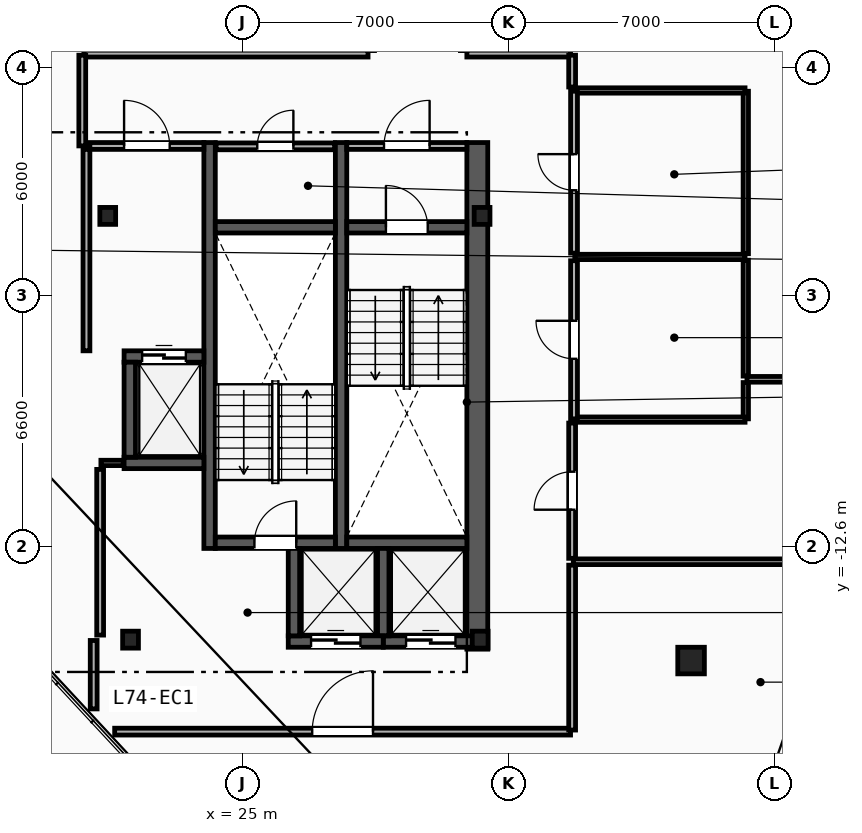
"""IFC4 building model, lengths in metres.
Left out: names, types, materials, properties, quantities, classifications, styles, units other than length and angle.
Written with IfcOpenShell. Run it as: python <this file> out.ifc"""

import sys

from ifc_helpers import new_model, si_unit, direction, frame, frame_2d, origin, origin_2d, place, context, subcontext, project, spatial, rectangle, i_section, extrude, element, fill, save


model = new_model("IFC4")
c1 = context("Model", 3, precision=1e-05, world=origin(), true_north=direction((0.0, 1.0)))
c2 = subcontext(c1, "Body", "Model", "MODEL_VIEW")
j1 = project(units=[si_unit("LENGTHUNIT", "METRE"), si_unit("PLANEANGLEUNIT", "RADIAN")], contexts=[c1])
p1 = place(None, origin())
s1 = spatial("IfcSite", under=j1, at=p1, CompositionType="ELEMENT")
p2 = place(p1, origin())
s2 = spatial("IfcBuilding", under=s1, at=p2, CompositionType="ELEMENT")
p3 = place(p2, frame((0.0, 0.0, 279.2)))
s3 = spatial("IfcBuildingStorey", under=s2, at=p3, CompositionType="ELEMENT", Elevation=279.2)
for number, where, z_axis, x_axis in (
    (1, (31.3, -3.9, 0.0), (0.0, 0.0, 1.0), (1.0, 0.0, 0.0)),
    (2, (21.45, -3.9, 0.0), (0.0, 0.0, 1.0), (1.0, 0.0, 0.0)),
    (3, (22.05, -15.05, 0.0), (0.0, 0.0, 1.0), (1.0, 0.0, 0.0)),
    (4, (31.25, -15.05, 0.0), (0.0, 0.0, 1.0), (1.0, 0.0, 0.0)),
):
    element("IfcColumn", number, at=place(p3, frame(where, z_axis=z_axis, x_axis=x_axis)), inside=s3, PredefinedType="COLUMN", context=c2, shape_type="SweptSolid", body=[
        extrude(i_section(OverallWidth=0.416, OverallDepth=0.446, WebThickness=0.039, FlangeThickness=0.063, FilletRadius=0.018, at=origin_2d()), origin(), (0.0, 0.0, 1.0), 3.6),
    ])
p4 = place(p3, frame((36.8, -15.6, 0.0), z_axis=(0.0, 0.0, 1.0), x_axis=(1.0, 0.0, 0.0)))
e5 = element("IfcColumn", 5, at=p4, inside=s3, PredefinedType="COLUMN", context=c2, shape_type="SweptSolid", body=[
    extrude(rectangle(XDim=0.7, YDim=0.7, at=origin_2d()), origin(), (0.0, 0.0, 1.0), 3.6),
])
p5 = place(p3, frame((31.175, -15.3, 0.0), z_axis=(0.0, 0.0, 1.0), x_axis=(0.0, 1.0, 0.0)))
e6 = element("IfcWall", 6, at=p5, inside=s3, PredefinedType="SHEAR", context=c2, shape_type="SweptSolid", body=[
    extrude(rectangle(XDim=13.33, YDim=0.55, at=frame_2d((6.665, 0.0))), origin(), (0.0, 0.0, 1.0), 3.34),
])
for number, where, z_axis, x_axis in (
    (7, (27.59, -12.65, 0.0), (0.0, 0.0, 1.0), (0.0, 1.0, 0.0)),
    (8, (24.13, -12.65, 0.0), (0.0, 0.0, 1.0), (0.0, 1.0, 0.0)),
):
    element("IfcWall", number, at=place(p3, frame(where, z_axis=z_axis, x_axis=x_axis)), inside=s3, PredefinedType="SHEAR", context=c2, shape_type="SweptSolid", body=[
        extrude(rectangle(XDim=10.68, YDim=0.3, at=frame_2d((5.34, 0.0))), origin(), (0.0, 0.0, 1.0), 3.34),
    ])
p6 = place(p3, frame((27.74, -4.2, 0.0), z_axis=(0.0, 0.0, 1.0), x_axis=(1.0, 0.0, 0.0)))
e9 = element("IfcWall", 9, at=p6, inside=s3, PredefinedType="SHEAR", context=c2, shape_type="SweptSolid", body=[
    extrude(rectangle(XDim=3.16, YDim=0.3, at=frame_2d((1.58, 0.0))), origin(), (0.0, 0.0, 1.0), 3.34),
])
p7 = place(p6, frame((1.03, 0.0, 0.0)))
e10 = element("IfcOpeningElement", 10, at=p7, cuts=e9, PredefinedType="OPENING", context=c2, shape_type="SweptSolid", body=[
    extrude(rectangle(XDim=1.1, YDim=2.15, at=frame_2d((0.55, 1.075))), frame((0.0, 0.16, 0.0), z_axis=(0.0, -1.0, 0.0), x_axis=(1.0, 0.0, 0.0)), (0.0, 0.0, 1.0), 0.32),
])
p8 = place(p3, frame((27.74, -12.5, 0.0), z_axis=(0.0, 0.0, 1.0), x_axis=(1.0, 0.0, 0.0)))
e11 = element("IfcWall", 11, at=p8, inside=s3, PredefinedType="SHEAR", context=c2, shape_type="SweptSolid", body=[
    extrude(rectangle(XDim=3.16, YDim=0.3, at=frame_2d((1.58, 0.0))), origin(), (0.0, 0.0, 1.0), 3.34),
])
p9 = place(p3, frame((24.28, -12.5, 0.0), z_axis=(0.0, 0.0, 1.0), x_axis=(1.0, 0.0, 0.0)))
e12 = element("IfcWall", 12, at=p9, inside=s3, PredefinedType="SHEAR", context=c2, shape_type="SweptSolid", body=[
    extrude(rectangle(XDim=3.16, YDim=0.3, at=frame_2d((1.58, 0.0))), origin(), (0.0, 0.0, 1.0), 3.34),
])
p10 = place(p9, frame((1.03, 0.0, 0.0)))
e13 = element("IfcOpeningElement", 13, at=p10, cuts=e12, PredefinedType="OPENING", context=c2, shape_type="SweptSolid", body=[
    extrude(rectangle(XDim=1.1, YDim=2.15, at=frame_2d((0.55, 1.075))), frame((0.0, 0.16, 0.0), z_axis=(0.0, -1.0, 0.0), x_axis=(1.0, 0.0, 0.0)), (0.0, 0.0, 1.0), 0.32),
])
p11 = place(p3, frame((24.28, -4.2, 0.0), z_axis=(0.0, 0.0, 1.0), x_axis=(1.0, 0.0, 0.0)))
e14 = element("IfcWall", 14, at=p11, inside=s3, PredefinedType="SHEAR", context=c2, shape_type="SweptSolid", body=[
    extrude(rectangle(XDim=3.16, YDim=0.3, at=frame_2d((1.58, 0.0))), origin(), (0.0, 0.0, 1.0), 3.34),
])
p12 = place(p3, frame((20.89, -7.45, 0.0), z_axis=(0.0, 0.0, 1.0), x_axis=(0.0, 1.0, 0.0)))
e15 = element("IfcWall", 15, at=p12, inside=s3, PredefinedType="PARTITIONING", context=c2, shape_type="SweptSolid", body=[
    extrude(rectangle(XDim=5.3, YDim=0.18, at=frame_2d((2.65, 0.0))), origin(), (0.0, 0.0, 1.0), 3.34),
])
p13 = place(p3, frame((20.98, -2.06, 0.0), z_axis=(0.0, 0.0, 1.0), x_axis=(1.0, 0.0, 0.0)))
e16 = element("IfcWall", 16, at=p13, inside=s3, PredefinedType="PARTITIONING", context=c2, shape_type="SweptSolid", body=[
    extrude(rectangle(XDim=3.0, YDim=0.18, at=frame_2d((1.5, 0.0))), origin(), (0.0, 0.0, 1.0), 3.34),
])
p14 = place(p13, frame((0.9, 0.0, 0.0)))
e17 = element("IfcOpeningElement", 17, at=p14, cuts=e16, PredefinedType="OPENING", context=c2, shape_type="SweptSolid", body=[
    extrude(rectangle(XDim=1.2, YDim=2.15, at=frame_2d((0.6, 1.075))), frame((0.0, 0.1, 0.0), z_axis=(0.0, -1.0, 0.0), x_axis=(1.0, 0.0, 0.0)), (0.0, 0.0, 1.0), 0.2),
])
p15 = place(p3, frame((27.74, -2.06, 0.0), z_axis=(0.0, 0.0, 1.0), x_axis=(1.0, 0.0, 0.0)))
e18 = element("IfcWall", 18, at=p15, inside=s3, PredefinedType="PARTITIONING", context=c2, shape_type="SweptSolid", body=[
    extrude(rectangle(XDim=3.16, YDim=0.18, at=frame_2d((1.58, 0.0))), origin(), (0.0, 0.0, 1.0), 3.34),
])
p16 = place(p15, frame((0.98, 0.0, 0.0)))
e19 = element("IfcOpeningElement", 19, at=p16, cuts=e18, PredefinedType="OPENING", context=c2, shape_type="SweptSolid", body=[
    extrude(rectangle(XDim=1.2, YDim=2.15, at=frame_2d((0.6, 1.075))), frame((0.0, 0.1, 0.0), z_axis=(0.0, -1.0, 0.0), x_axis=(1.0, 0.0, 0.0)), (0.0, 0.0, 1.0), 0.2),
])
p17 = place(p3, frame((21.88, -7.6, 0.0), z_axis=(0.0, 0.0, 1.0), x_axis=(1.0, 0.0, 0.0)))
e20 = element("IfcWall", 20, at=p17, inside=s3, PredefinedType="SHEAR", context=c2, shape_type="SweptSolid", body=[
    extrude(rectangle(XDim=2.1, YDim=0.3, at=frame_2d((1.05, 0.0))), origin(), (0.0, 0.0, 1.0), 3.34),
])
p18 = place(p17, frame((0.475, 0.0, 0.0)))
e21 = element("IfcOpeningElement", 21, at=p18, cuts=e20, PredefinedType="OPENING", context=c2, shape_type="SweptSolid", body=[
    extrude(rectangle(XDim=1.15, YDim=2.2, at=frame_2d((0.575, 1.1))), frame((0.0, 0.16, 0.0), z_axis=(0.0, -1.0, 0.0), x_axis=(1.0, 0.0, 0.0)), (0.0, 0.0, 1.0), 0.32),
])
p19 = place(p3, frame((21.88, -10.4, 0.0), z_axis=(0.0, 0.0, 1.0), x_axis=(1.0, 0.0, 0.0)))
e22 = element("IfcWall", 22, at=p19, inside=s3, PredefinedType="SHEAR", context=c2, shape_type="SweptSolid", body=[
    extrude(rectangle(XDim=2.1, YDim=0.3, at=frame_2d((1.05, 0.0))), origin(), (0.0, 0.0, 1.0), 3.34),
])
p20 = place(p3, frame((22.03, -10.25, 0.0), z_axis=(0.0, 0.0, 1.0), x_axis=(0.0, 1.0, 0.0)))
e23 = element("IfcWall", 23, at=p20, inside=s3, PredefinedType="SHEAR", context=c2, shape_type="SweptSolid", body=[
    extrude(rectangle(XDim=2.5, YDim=0.3, at=frame_2d((1.25, 0.0))), origin(), (0.0, 0.0, 1.0), 3.34),
])
p21 = place(p3, frame((28.7, -15.1, 0.0), z_axis=(0.0, 0.0, 1.0), x_axis=(1.0, 0.0, 0.0)))
e24 = element("IfcWall", 24, at=p21, inside=s3, PredefinedType="SHEAR", context=c2, shape_type="SweptSolid", body=[
    extrude(rectangle(XDim=2.5, YDim=0.3, at=frame_2d((1.25, 0.0))), origin(), (0.0, 0.0, 1.0), 3.34),
])
p22 = place(p21, frame((0.6, 0.0, 0.0)))
e25 = element("IfcOpeningElement", 25, at=p22, cuts=e24, PredefinedType="OPENING", context=c2, shape_type="SweptSolid", body=[
    extrude(rectangle(XDim=1.3, YDim=2.2, at=frame_2d((0.65, 1.1))), frame((0.0, 0.16, 0.0), z_axis=(0.0, -1.0, 0.0), x_axis=(1.0, 0.0, 0.0)), (0.0, 0.0, 1.0), 0.32),
])
p23 = place(p3, frame((28.7, -14.95, 0.0), z_axis=(0.0, 0.0, 1.0), x_axis=(0.0, 1.0, 0.0)))
e26 = element("IfcWall", 26, at=p23, inside=s3, PredefinedType="SHEAR", context=c2, shape_type="SweptSolid", body=[
    extrude(rectangle(XDim=2.3, YDim=0.3, at=frame_2d((1.15, 0.0))), origin(), (0.0, 0.0, 1.0), 3.34),
])
p24 = place(p3, frame((26.2, -15.1, 0.0), z_axis=(0.0, 0.0, 1.0), x_axis=(1.0, 0.0, 0.0)))
e27 = element("IfcWall", 27, at=p24, inside=s3, PredefinedType="SHEAR", context=c2, shape_type="SweptSolid", body=[
    extrude(rectangle(XDim=2.5, YDim=0.3, at=frame_2d((1.25, 0.0))), origin(), (0.0, 0.0, 1.0), 3.34),
])
p25 = place(p24, frame((0.6, 0.0, 0.0)))
e28 = element("IfcOpeningElement", 28, at=p25, cuts=e27, PredefinedType="OPENING", context=c2, shape_type="SweptSolid", body=[
    extrude(rectangle(XDim=1.3, YDim=2.2, at=frame_2d((0.65, 1.1))), frame((0.0, 0.16, 0.0), z_axis=(0.0, -1.0, 0.0), x_axis=(1.0, 0.0, 0.0)), (0.0, 0.0, 1.0), 0.32),
])
p26 = place(p3, frame((26.35, -14.95, 0.0), z_axis=(0.0, 0.0, 1.0), x_axis=(0.0, 1.0, 0.0)))
e29 = element("IfcWall", 29, at=p26, inside=s3, PredefinedType="SHEAR", context=c2, shape_type="SweptSolid", body=[
    extrude(rectangle(XDim=2.3, YDim=0.3, at=frame_2d((1.15, 0.0))), origin(), (0.0, 0.0, 1.0), 3.34),
])
p27 = place(p3, frame((21.27, -10.4, 0.0), z_axis=(0.0, 0.0, 1.0), x_axis=(1.0, 0.0, 0.0)))
e30 = element("IfcWall", 30, at=p27, inside=s3, PredefinedType="PARTITIONING", context=c2, shape_type="SweptSolid", body=[
    extrude(rectangle(XDim=0.59, YDim=0.14, at=frame_2d((0.295, 0.0))), origin(), (0.0, 0.0, 1.0), 3.34),
])
p28 = place(p3, frame((21.25, -14.93, 0.0), z_axis=(0.0, 0.0, 1.0), x_axis=(0.0, 1.0, 0.0)))
e31 = element("IfcWall", 31, at=p28, inside=s3, PredefinedType="PARTITIONING", context=c2, shape_type="SweptSolid", body=[
    extrude(rectangle(XDim=4.36, YDim=0.18, at=frame_2d((2.18, 0.0))), origin(), (0.0, 0.0, 1.0), 3.34),
])
p29 = place(p3, frame((24.3, -2.07, 0.0), z_axis=(0.0, 0.0, 1.0), x_axis=(1.0, 0.0, 0.0)))
e32 = element("IfcWall", 32, at=p29, inside=s3, PredefinedType="PARTITIONING", context=c2, shape_type="SweptSolid", body=[
    extrude(rectangle(XDim=3.12, YDim=0.18, at=frame_2d((1.56, 0.0))), origin(), (0.0, 0.0, 1.0), 3.34),
])
p30 = place(p29, frame((1.085, 0.0, 0.0)))
e33 = element("IfcOpeningElement", 33, at=p30, cuts=e32, PredefinedType="OPENING", context=c2, shape_type="SweptSolid", body=[
    extrude(rectangle(XDim=0.95, YDim=2.1, at=frame_2d((0.475, 1.05))), frame((0.0, 0.1, 0.0), z_axis=(0.0, -1.0, 0.0), x_axis=(1.0, 0.0, 0.0)), (0.0, 0.0, 1.0), 0.2),
])
p31 = place(p3, frame((38.24, -9.24, 0.0), z_axis=(0.0, 0.0, 1.0), x_axis=(0.0, 1.0, 0.0)))
e34 = element("IfcWall", 34, at=p31, inside=s3, PredefinedType="PARTITIONING", context=c2, shape_type="SweptSolid", body=[
    extrude(rectangle(XDim=0.955, YDim=0.14, at=frame_2d((0.478, 0.0))), origin(), (0.0, 0.0, 1.0), 3.34),
])
p32 = place(p3, frame((38.24, -8.115, 0.0), z_axis=(0.0, 0.0, 1.0), x_axis=(0.0, 1.0, 0.0)))
e35 = element("IfcWall", 35, at=p32, inside=s3, PredefinedType="PARTITIONING", context=c2, shape_type="SweptSolid", body=[
    extrude(rectangle(XDim=3.05, YDim=0.14, at=frame_2d((1.525, 0.0))), origin(), (0.0, 0.0, 1.0), 3.34),
])
p33 = place(p3, frame((38.24, -4.895, 0.0), z_axis=(0.0, 0.0, 1.0), x_axis=(0.0, 1.0, 0.0)))
e36 = element("IfcWall", 36, at=p33, inside=s3, PredefinedType="PARTITIONING", context=c2, shape_type="SweptSolid", body=[
    extrude(rectangle(XDim=4.275, YDim=0.14, at=frame_2d((2.137, 0.0))), origin(), (0.0, 0.0, 1.0), 3.34),
])
for number, where, z_axis, x_axis in (
    (37, (33.74, -0.6, 0.0), (0.0, 0.0, 1.0), (1.0, 0.0, 0.0)),
    (38, (33.74, -4.98, 0.0), (0.0, 0.0, 1.0), (1.0, 0.0, 0.0)),
    (39, (33.74, -9.26, 0.0), (0.0, 0.0, 1.0), (1.0, 0.0, 0.0)),
):
    element("IfcWall", number, at=place(p3, frame(where, z_axis=z_axis, x_axis=x_axis)), inside=s3, PredefinedType="PARTITIONING", context=c2, shape_type="SweptSolid", body=[
        extrude(rectangle(XDim=4.48, YDim=0.14, at=frame_2d((2.24, 0.0))), origin(), (0.0, 0.0, 1.0), 3.34),
    ])
p34 = place(p3, frame((33.72, -4.88, 0.0), z_axis=(0.0, 0.0, 1.0), x_axis=(0.0, 1.0, 0.0)))
e40 = element("IfcWall", 40, at=p34, inside=s3, PredefinedType="PARTITIONING", context=c2, shape_type="SweptSolid", body=[
    extrude(rectangle(XDim=4.26, YDim=0.18, at=frame_2d((2.13, 0.0))), origin(), (0.0, 0.0, 1.0), 3.34),
])
p35 = place(p34, frame((1.655, 0.0, 0.0)))
e41 = element("IfcOpeningElement", 41, at=p35, cuts=e40, PredefinedType="OPENING", context=c2, shape_type="SweptSolid", body=[
    extrude(rectangle(XDim=0.95, YDim=2.1, at=frame_2d((0.475, 1.05))), frame((0.0, 0.1, 0.0), z_axis=(0.0, -1.0, 0.0), x_axis=(1.0, 0.0, 0.0)), (0.0, 0.0, 1.0), 0.2),
])
p36 = place(p3, frame((33.72, -9.24, 0.0), z_axis=(0.0, 0.0, 1.0), x_axis=(0.0, 1.0, 0.0)))
e42 = element("IfcWall", 42, at=p36, inside=s3, PredefinedType="PARTITIONING", context=c2, shape_type="SweptSolid", body=[
    extrude(rectangle(XDim=4.16, YDim=0.18, at=frame_2d((2.08, 0.0))), origin(), (0.0, 0.0, 1.0), 3.34),
])
p37 = place(p36, frame((1.58, 0.0, 0.0)))
e43 = element("IfcOpeningElement", 43, at=p37, cuts=e42, PredefinedType="OPENING", context=c2, shape_type="SweptSolid", body=[
    extrude(rectangle(XDim=1.0, YDim=2.15, at=frame_2d((0.5, 1.075))), frame((0.0, 0.1, 0.0), z_axis=(0.0, -1.0, 0.0), x_axis=(1.0, 0.0, 0.0)), (0.0, 0.0, 1.0), 0.2),
])
p38 = place(p3, frame((38.27, -8.2, 0.0), z_axis=(0.0, 0.0, 1.0), x_axis=(1.0, 0.0, 0.0)))
e44 = element("IfcWall", 44, at=p38, inside=s3, PredefinedType="PARTITIONING", context=c2, shape_type="SweptSolid", body=[
    extrude(rectangle(XDim=8.971, YDim=0.15, at=frame_2d((4.486, 0.0))), origin(), (0.0, 0.0, 1.0), 3.34),
])
p39 = place(p3, frame((33.7, -13.0, 0.0), z_axis=(0.0, 0.0, 1.0), x_axis=(1.0, 0.0, 0.0)))
e45 = element("IfcWall", 45, at=p39, inside=s3, PredefinedType="PARTITIONING", context=c2, shape_type="SweptSolid", body=[
    extrude(rectangle(XDim=12.013, YDim=0.15, at=frame_2d((6.006, 0.0))), origin(), (0.0, 0.0, 1.0), 3.34),
])
p40 = place(p3, frame((21.632, -17.47, 0.0), z_axis=(0.0, 0.0, 1.0), x_axis=(1.0, 0.0, 0.0)))
e46 = element("IfcWall", 46, at=p40, inside=s3, PredefinedType="PARTITIONING", context=c2, shape_type="SweptSolid", body=[
    extrude(rectangle(XDim=11.996, YDim=0.18, at=frame_2d((5.998, 0.0))), origin(), (0.0, 0.0, 1.0), 3.34),
])
p41 = place(p40, frame((5.198, 0.0, 0.0)))
e47 = element("IfcOpeningElement", 47, at=p41, cuts=e46, PredefinedType="OPENING", context=c2, shape_type="SweptSolid", body=[
    extrude(rectangle(XDim=1.6, YDim=2.2, at=frame_2d((0.8, 1.1))), frame((0.0, 0.1, 0.0), z_axis=(0.0, -1.0, 0.0), x_axis=(1.0, 0.0, 0.0)), (0.0, 0.0, 1.0), 0.2),
])
p42 = place(p3, frame((33.67, -17.428, 0.0), z_axis=(0.0, 0.0, 1.0), x_axis=(0.0, 1.0, 0.0)))
e48 = element("IfcWall", 48, at=p42, inside=s3, PredefinedType="PARTITIONING", context=c2, shape_type="SweptSolid", body=[
    extrude(rectangle(XDim=4.338, YDim=0.18, at=frame_2d((2.169, 0.0))), origin(), (0.0, 0.0, 1.0), 3.34),
])
p43 = place(p3, frame((33.67, -12.91, 0.0), z_axis=(0.0, 0.0, 1.0), x_axis=(0.0, 1.0, 0.0)))
e49 = element("IfcWall", 49, at=p43, inside=s3, PredefinedType="PARTITIONING", context=c2, shape_type="SweptSolid", body=[
    extrude(rectangle(XDim=3.559, YDim=0.18, at=frame_2d((1.779, 0.0))), origin(), (0.0, 0.0, 1.0), 3.34),
])
p44 = place(p43, frame((1.279, 0.0, 0.0)))
e50 = element("IfcOpeningElement", 50, at=p44, cuts=e49, PredefinedType="OPENING", context=c2, shape_type="SweptSolid", body=[
    extrude(rectangle(XDim=1.0, YDim=2.15, at=frame_2d((0.5, 1.075))), frame((0.0, 0.1, 0.0), z_axis=(0.0, -1.0, 0.0), x_axis=(1.0, 0.0, 0.0)), (0.0, 0.0, 1.0), 0.2),
])
p45 = place(p3, frame((28.3, 0.37, 0.0), z_axis=(0.0, 0.0, 1.0), x_axis=(-1.0, 0.0, 0.0)))
e51 = element("IfcWall", 51, at=p45, inside=s3, PredefinedType="PARTITIONING", context=c2, shape_type="SweptSolid", body=[
    extrude(rectangle(XDim=7.479, YDim=0.18, at=frame_2d((3.739, 0.0))), origin(), (0.0, 0.0, 1.0), 3.34),
])
p46 = place(p3, frame((20.78, 0.329, 0.0), z_axis=(0.0, 0.0, 1.0), x_axis=(0.0, -1.0, 0.0)))
e52 = element("IfcWall", 52, at=p46, inside=s3, PredefinedType="PARTITIONING", context=c2, shape_type="SweptSolid", body=[
    extrude(rectangle(XDim=2.387, YDim=0.18, at=frame_2d((1.194, 0.0))), origin(), (0.0, 0.0, 1.0), 3.34),
])
p47 = place(p3, frame((21.08, -15.072, 0.0), z_axis=(0.0, 0.0, 1.0), x_axis=(0.0, -1.0, 0.0)))
e53 = element("IfcWall", 53, at=p47, inside=s3, PredefinedType="PARTITIONING", context=c2, shape_type="SweptSolid", body=[
    extrude(rectangle(XDim=1.801, YDim=0.18, at=frame_2d((0.9, 0.0))), origin(), (0.0, 0.0, 1.0), 3.34),
])
p48 = place(p3, frame((33.628, 0.37, 0.0), z_axis=(0.0, 0.0, 1.0), x_axis=(-1.0, 0.0, 0.0)))
e54 = element("IfcWall", 54, at=p48, inside=s3, PredefinedType="PARTITIONING", context=c2, shape_type="SweptSolid", body=[
    extrude(rectangle(XDim=2.729, YDim=0.18, at=frame_2d((1.364, 0.0))), origin(), (0.0, 0.0, 1.0), 3.34),
])
p49 = place(p3, frame((33.67, -0.509, 0.0), z_axis=(0.0, 0.0, 1.0), x_axis=(0.0, 1.0, 0.0)))
e55 = element("IfcWall", 55, at=p49, inside=s3, PredefinedType="PARTITIONING", context=c2, shape_type="SweptSolid", body=[
    extrude(rectangle(XDim=0.837, YDim=0.18, at=frame_2d((0.418, 0.0))), origin(), (0.0, 0.0, 1.0), 3.34),
])
p50 = place(p7, origin())
e56 = element("IfcDoor", 56, at=p50, inside=s3, OperationType="SINGLE_SWING_LEFT", PredefinedType="DOOR", context=c2, shape_type="SweptSolid", body=[
    extrude(rectangle(XDim=1.1, YDim=2.15, at=frame_2d((0.55, 1.075))), frame((0.0, 0.025, 0.0), z_axis=(0.0, -1.0, 0.0), x_axis=(1.0, 0.0, 0.0)), (0.0, 0.0, 1.0), 0.05),
])
fill(e10, e56)
p51 = place(p10, origin())
e57 = element("IfcDoor", 57, at=p51, inside=s3, OperationType="SINGLE_SWING_RIGHT", PredefinedType="DOOR", context=c2, shape_type="SweptSolid", body=[
    extrude(rectangle(XDim=1.1, YDim=2.15, at=frame_2d((0.55, 1.075))), frame((0.0, 0.025, 0.0), z_axis=(0.0, -1.0, 0.0), x_axis=(1.0, 0.0, 0.0)), (0.0, 0.0, 1.0), 0.05),
])
fill(e13, e57)
p52 = place(p14, origin())
e58 = element("IfcDoor", 58, at=p52, inside=s3, OperationType="SINGLE_SWING_LEFT", PredefinedType="DOOR", context=c2, shape_type="SweptSolid", body=[
    extrude(rectangle(XDim=1.2, YDim=2.15, at=frame_2d((0.6, 1.075))), frame((0.0, 0.025, 0.0), z_axis=(0.0, -1.0, 0.0), x_axis=(1.0, 0.0, 0.0)), (0.0, 0.0, 1.0), 0.05),
])
fill(e17, e58)
p53 = place(p16, origin())
e59 = element("IfcDoor", 59, at=p53, inside=s3, OperationType="SINGLE_SWING_RIGHT", PredefinedType="DOOR", context=c2, shape_type="SweptSolid", body=[
    extrude(rectangle(XDim=1.2, YDim=2.15, at=frame_2d((0.6, 1.075))), frame((0.0, 0.025, 0.0), z_axis=(0.0, -1.0, 0.0), x_axis=(1.0, 0.0, 0.0)), (0.0, 0.0, 1.0), 0.05),
])
fill(e19, e59)
p54 = place(p18, origin())
e60 = element("IfcDoor", 60, at=p54, inside=s3, OperationType="SLIDING_TO_LEFT", PredefinedType="TRAPDOOR", context=c2, shape_type="SweptSolid", body=[
    extrude(rectangle(XDim=1.15, YDim=2.2, at=frame_2d((0.575, 1.1))), frame((0.0, 0.025, 0.0), z_axis=(0.0, -1.0, 0.0), x_axis=(1.0, 0.0, 0.0)), (0.0, 0.0, 1.0), 0.05),
])
fill(e21, e60)
p55 = place(p22, origin())
e61 = element("IfcDoor", 61, at=p55, inside=s3, OperationType="SLIDING_TO_LEFT", PredefinedType="TRAPDOOR", context=c2, shape_type="SweptSolid", body=[
    extrude(rectangle(XDim=1.3, YDim=2.2, at=frame_2d((0.65, 1.1))), frame((0.0, 0.025, 0.0), z_axis=(0.0, -1.0, 0.0), x_axis=(1.0, 0.0, 0.0)), (0.0, 0.0, 1.0), 0.05),
])
fill(e25, e61)
p56 = place(p25, origin())
e62 = element("IfcDoor", 62, at=p56, inside=s3, OperationType="SLIDING_TO_LEFT", PredefinedType="TRAPDOOR", context=c2, shape_type="SweptSolid", body=[
    extrude(rectangle(XDim=1.3, YDim=2.2, at=frame_2d((0.65, 1.1))), frame((0.0, 0.025, 0.0), z_axis=(0.0, -1.0, 0.0), x_axis=(1.0, 0.0, 0.0)), (0.0, 0.0, 1.0), 0.05),
])
fill(e28, e62)
p57 = place(p41, origin())
e63 = element("IfcDoor", 63, at=p57, inside=s3, OperationType="SINGLE_SWING_RIGHT", PredefinedType="DOOR", context=c2, shape_type="SweptSolid", body=[
    extrude(rectangle(XDim=1.6, YDim=2.2, at=frame_2d((0.8, 1.1))), frame((0.0, 0.025, 0.0), z_axis=(0.0, -1.0, 0.0), x_axis=(1.0, 0.0, 0.0)), (0.0, 0.0, 1.0), 0.05),
])
fill(e47, e63)
p58 = place(p35, origin())
e64 = element("IfcDoor", 64, at=p58, inside=s3, OperationType="SINGLE_SWING_RIGHT", PredefinedType="DOOR", context=c2, shape_type="SweptSolid", body=[
    extrude(rectangle(XDim=0.95, YDim=2.1, at=frame_2d((0.475, 1.05))), frame((0.0, 0.025, 0.0), z_axis=(0.0, -1.0, 0.0), x_axis=(1.0, 0.0, 0.0)), (0.0, 0.0, 1.0), 0.05),
])
fill(e41, e64)
p59 = place(p37, origin())
e65 = element("IfcDoor", 65, at=p59, inside=s3, OperationType="SINGLE_SWING_RIGHT", PredefinedType="DOOR", context=c2, shape_type="SweptSolid", body=[
    extrude(rectangle(XDim=1.0, YDim=2.15, at=frame_2d((0.5, 1.075))), frame((0.0, 0.025, 0.0), z_axis=(0.0, -1.0, 0.0), x_axis=(1.0, 0.0, 0.0)), (0.0, 0.0, 1.0), 0.05),
])
fill(e43, e65)
p60 = place(p44, origin())
e66 = element("IfcDoor", 66, at=p60, inside=s3, OperationType="SINGLE_SWING_LEFT", PredefinedType="DOOR", context=c2, shape_type="SweptSolid", body=[
    extrude(rectangle(XDim=1.0, YDim=2.15, at=frame_2d((0.5, 1.075))), frame((0.0, 0.025, 0.0), z_axis=(0.0, -1.0, 0.0), x_axis=(1.0, 0.0, 0.0)), (0.0, 0.0, 1.0), 0.05),
])
fill(e50, e66)
p61 = place(p30, origin())
e67 = element("IfcDoor", 67, at=p61, inside=s3, OperationType="SINGLE_SWING_RIGHT", PredefinedType="DOOR", context=c2, shape_type="SweptSolid", body=[
    extrude(rectangle(XDim=0.95, YDim=2.1, at=frame_2d((0.475, 1.05))), frame((0.0, 0.025, 0.0), z_axis=(0.0, -1.0, 0.0), x_axis=(1.0, 0.0, 0.0)), (0.0, 0.0, 1.0), 0.05),
])
fill(e33, e67)
save(model, sys.argv[1])
